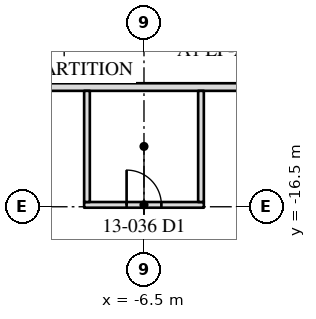
"""IFC4 building model, lengths in metres.
Left out: names, types, materials, properties, quantities, classifications, styles, units other than length and angle.
Written with IfcOpenShell. Run it as: python <this file> out.ifc"""

import sys

from ifc_helpers import new_model, si_unit, direction, frame, frame_2d, origin, place, context, subcontext, project, spatial, rectangle, extrude, element, fill, save


model = new_model("IFC4")
c1 = context("Model", 3, precision=1e-05, world=origin(), true_north=direction((0.0, 1.0)))
c2 = subcontext(c1, "Body", "Model", "MODEL_VIEW")
j1 = project(units=[si_unit("LENGTHUNIT", "METRE"), si_unit("PLANEANGLEUNIT", "RADIAN")], contexts=[c1])
p1 = place(None, origin())
s1 = spatial("IfcSite", under=j1, at=p1, CompositionType="ELEMENT")
p2 = place(p1, origin())
s2 = spatial("IfcBuilding", under=s1, at=p2, CompositionType="ELEMENT")
p3 = place(p2, frame((0.0, 0.0, 57.0)))
s3 = spatial("IfcBuildingStorey", under=s2, at=p3, CompositionType="ELEMENT", Elevation=57.0)
p4 = place(p3, frame((-13.45, -13.35, 0.0), z_axis=(0.0, 0.0, 1.0), x_axis=(1.0, 0.0, 0.0)))
e1 = element("IfcWall", 1, at=p4, inside=s3, PredefinedType="PARTITIONING", context=c2, shape_type="SweptSolid", body=[
    extrude(rectangle(XDim=26.7, YDim=0.2, at=frame_2d((13.35, 0.0))), origin(), (0.0, 0.0, 1.0), 3.91),
])
p5 = place(p3, frame((-8.075, -16.45, 0.0), z_axis=(0.0, 0.0, 1.0), x_axis=(1.0, 0.0, 0.0)))
e2 = element("IfcWall", 2, at=p5, inside=s3, PredefinedType="PARTITIONING", context=c2, shape_type="SweptSolid", body=[
    extrude(rectangle(XDim=3.15, YDim=0.15, at=frame_2d((1.575, 0.0))), origin(), (0.0, 0.0, 1.0), 3.91),
])
p6 = place(p5, frame((1.117, 0.0, 0.0)))
e3 = element("IfcOpeningElement", 3, at=p6, cuts=e2, PredefinedType="OPENING", context=c2, shape_type="SweptSolid", body=[
    extrude(rectangle(XDim=0.915, YDim=2.134, at=frame_2d((0.458, 1.067))), frame((0.0, 0.085, 0.0), z_axis=(0.0, -1.0, 0.0), x_axis=(1.0, 0.0, 0.0)), (0.0, 0.0, 1.0), 0.17),
])
for number, where, z_axis, x_axis in (
    (4, (-8.0, -16.375, 0.0), (0.0, 0.0, 1.0), (0.0, 1.0, 0.0)),
    (5, (-5.0, -16.375, 0.0), (0.0, 0.0, 1.0), (0.0, 1.0, 0.0)),
):
    element("IfcWall", number, at=place(p3, frame(where, z_axis=z_axis, x_axis=x_axis)), inside=s3, PredefinedType="PARTITIONING", context=c2, shape_type="SweptSolid", body=[
        extrude(rectangle(XDim=2.925, YDim=0.15, at=frame_2d((1.462, 0.0))), origin(), (0.0, 0.0, 1.0), 3.91),
    ])
p7 = place(p6, origin())
e6 = element("IfcDoor", 6, at=p7, inside=s3, OperationType="SINGLE_SWING_LEFT", PredefinedType="DOOR", context=c2, shape_type="SweptSolid", body=[
    extrude(rectangle(XDim=0.915, YDim=2.134, at=frame_2d((0.458, 1.067))), frame((0.0, 0.025, 0.0), z_axis=(0.0, -1.0, 0.0), x_axis=(1.0, 0.0, 0.0)), (0.0, 0.0, 1.0), 0.05),
])
fill(e3, e6)
save(model, sys.argv[1])
